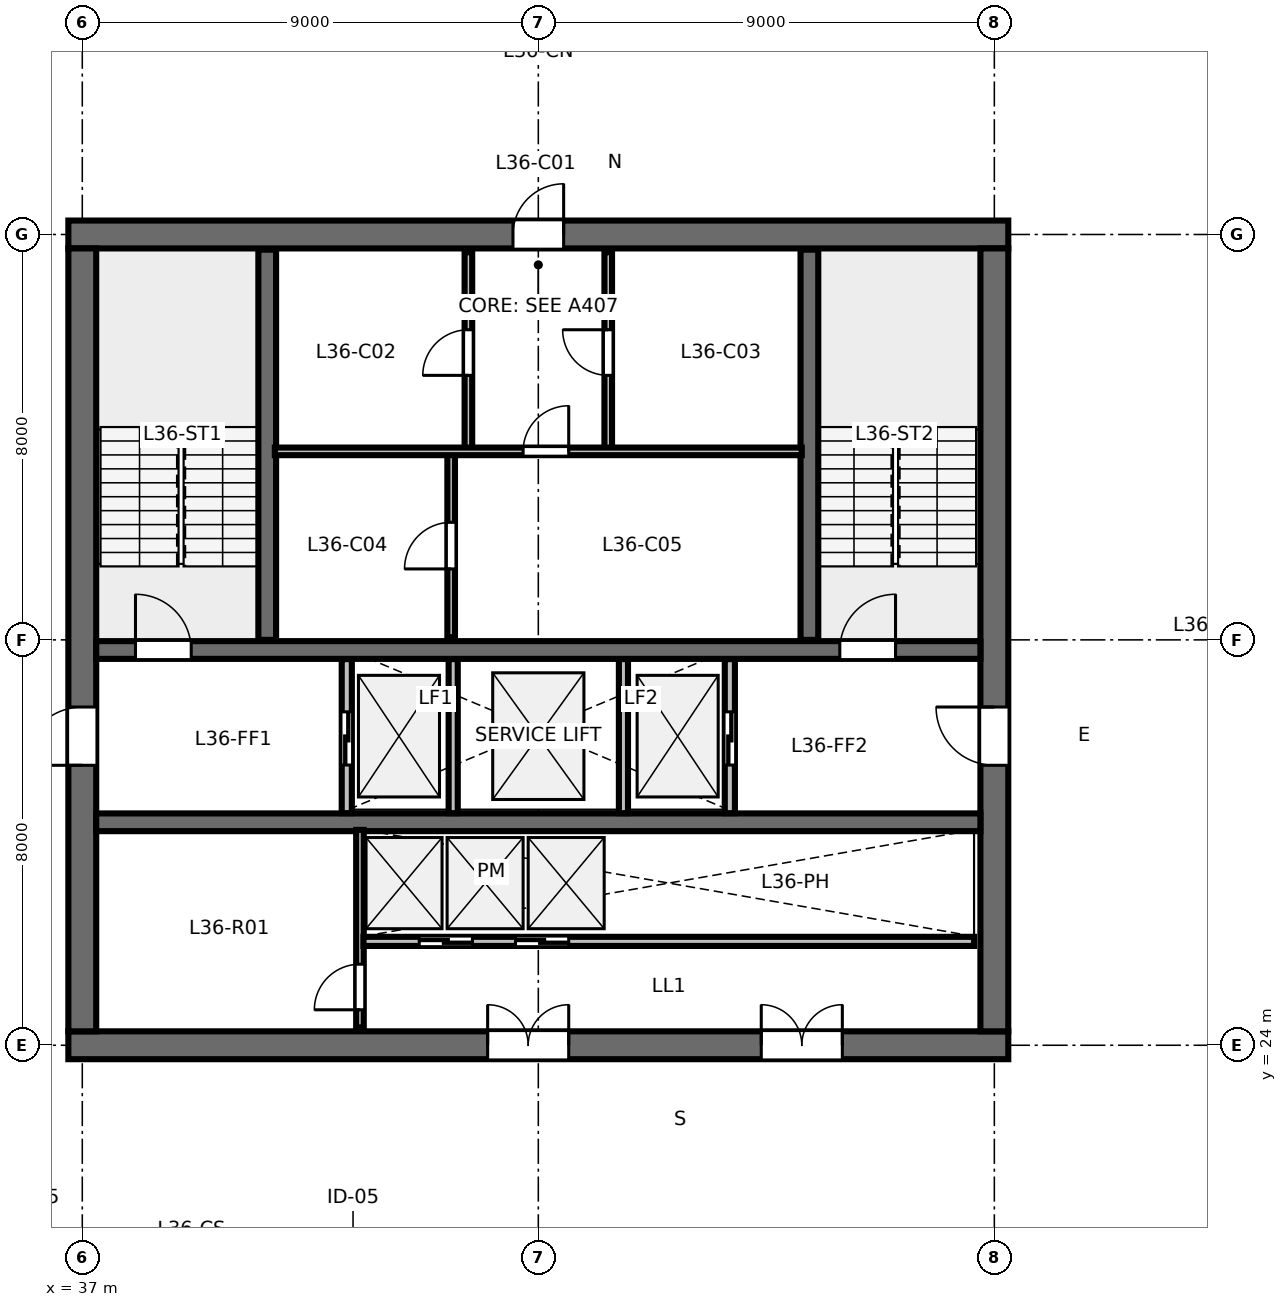
"""IFC4 building model, lengths in metres.
Left out: names, types, materials, properties, quantities, classifications, styles, units other than length and angle.
Written with IfcOpenShell. Run it as: python <this file> out.ifc"""

import sys

from ifc_helpers import new_model, si_unit, direction, frame, frame_2d, origin, place, context, subcontext, project, spatial, rectangle, extrude, element, fill, save


model = new_model("IFC4")
c1 = context("Model", 3, precision=1e-05, world=origin(), true_north=direction((0.0, 1.0)))
c2 = subcontext(c1, "Body", "Model", "MODEL_VIEW")
j1 = project(units=[si_unit("LENGTHUNIT", "METRE"), si_unit("PLANEANGLEUNIT", "RADIAN")], contexts=[c1])
p1 = place(None, origin())
s1 = spatial("IfcSite", under=j1, at=p1, CompositionType="ELEMENT")
p2 = place(p1, origin())
s2 = spatial("IfcBuilding", under=s1, at=p2, CompositionType="ELEMENT")
p3 = place(p2, frame((0.0, 0.0, 138.4)))
s3 = spatial("IfcBuildingStorey", under=s2, at=p3, CompositionType="ELEMENT", Elevation=138.4)
p4 = place(p3, frame((36.725, 24.0, 0.0), z_axis=(0.0, 0.0, 1.0), x_axis=(1.0, 0.0, 0.0)))
e1 = element("IfcWall", 1, at=p4, inside=s3, PredefinedType="SHEAR", context=c2, shape_type="SweptSolid", body=[
    extrude(rectangle(XDim=18.55, YDim=0.55, at=frame_2d((9.275, 0.0))), origin(), (0.0, 0.0, 1.0), 3.36),
])
p5 = place(p4, frame((8.275, 0.0, 0.0)))
e2 = element("IfcOpeningElement", 2, at=p5, cuts=e1, PredefinedType="OPENING", context=c2, shape_type="SweptSolid", body=[
    extrude(rectangle(XDim=1.6, YDim=2.15, at=frame_2d((0.8, 1.075))), frame((0.0, 0.285, 0.0), z_axis=(0.0, -1.0, 0.0), x_axis=(1.0, 0.0, 0.0)), (0.0, 0.0, 1.0), 0.57),
])
p6 = place(p4, frame((13.675, 0.0, 0.0)))
e3 = element("IfcOpeningElement", 3, at=p6, cuts=e1, PredefinedType="OPENING", context=c2, shape_type="SweptSolid", body=[
    extrude(rectangle(XDim=1.6, YDim=2.15, at=frame_2d((0.8, 1.075))), frame((0.0, 0.285, 0.0), z_axis=(0.0, -1.0, 0.0), x_axis=(1.0, 0.0, 0.0)), (0.0, 0.0, 1.0), 0.57),
])
p7 = place(p3, frame((36.725, 40.0, 0.0), z_axis=(0.0, 0.0, 1.0), x_axis=(1.0, 0.0, 0.0)))
e4 = element("IfcWall", 4, at=p7, inside=s3, PredefinedType="SHEAR", context=c2, shape_type="SweptSolid", body=[
    extrude(rectangle(XDim=18.55, YDim=0.55, at=frame_2d((9.275, 0.0))), origin(), (0.0, 0.0, 1.0), 3.36),
])
p8 = place(p7, frame((8.775, 0.0, 0.0)))
e5 = element("IfcOpeningElement", 5, at=p8, cuts=e4, PredefinedType="OPENING", context=c2, shape_type="SweptSolid", body=[
    extrude(rectangle(XDim=1.0, YDim=2.15, at=frame_2d((0.5, 1.075))), frame((0.0, 0.285, 0.0), z_axis=(0.0, -1.0, 0.0), x_axis=(1.0, 0.0, 0.0)), (0.0, 0.0, 1.0), 0.57),
])
p9 = place(p3, frame((37.0, 24.275, 0.0), z_axis=(0.0, 0.0, 1.0), x_axis=(0.0, 1.0, 0.0)))
e6 = element("IfcWall", 6, at=p9, inside=s3, PredefinedType="SHEAR", context=c2, shape_type="SweptSolid", body=[
    extrude(rectangle(XDim=15.45, YDim=0.55, at=frame_2d((7.725, 0.0))), origin(), (0.0, 0.0, 1.0), 3.36),
])
p10 = place(p9, frame((5.25, 0.0, 0.0)))
e7 = element("IfcOpeningElement", 7, at=p10, cuts=e6, PredefinedType="OPENING", context=c2, shape_type="SweptSolid", body=[
    extrude(rectangle(XDim=1.15, YDim=2.15, at=frame_2d((0.575, 1.075))), frame((0.0, 0.285, 0.0), z_axis=(0.0, -1.0, 0.0), x_axis=(1.0, 0.0, 0.0)), (0.0, 0.0, 1.0), 0.57),
])
p11 = place(p3, frame((55.0, 24.275, 0.0), z_axis=(0.0, 0.0, 1.0), x_axis=(0.0, 1.0, 0.0)))
e8 = element("IfcWall", 8, at=p11, inside=s3, PredefinedType="SHEAR", context=c2, shape_type="SweptSolid", body=[
    extrude(rectangle(XDim=15.45, YDim=0.55, at=frame_2d((7.725, 0.0))), origin(), (0.0, 0.0, 1.0), 3.36),
])
p12 = place(p11, frame((5.25, 0.0, 0.0)))
e9 = element("IfcOpeningElement", 9, at=p12, cuts=e8, PredefinedType="OPENING", context=c2, shape_type="SweptSolid", body=[
    extrude(rectangle(XDim=1.15, YDim=2.15, at=frame_2d((0.575, 1.075))), frame((0.0, 0.285, 0.0), z_axis=(0.0, -1.0, 0.0), x_axis=(1.0, 0.0, 0.0)), (0.0, 0.0, 1.0), 0.57),
])
p13 = place(p3, frame((37.275, 31.8, 0.0), z_axis=(0.0, 0.0, 1.0), x_axis=(1.0, 0.0, 0.0)))
e10 = element("IfcWall", 10, at=p13, inside=s3, PredefinedType="SHEAR", context=c2, shape_type="SweptSolid", body=[
    extrude(rectangle(XDim=17.45, YDim=0.35, at=frame_2d((8.725, 0.0))), origin(), (0.0, 0.0, 1.0), 3.36),
])
p14 = place(p13, frame((0.775, 0.0, 0.0)))
e11 = element("IfcOpeningElement", 11, at=p14, cuts=e10, PredefinedType="OPENING", context=c2, shape_type="SweptSolid", body=[
    extrude(rectangle(XDim=1.1, YDim=2.15, at=frame_2d((0.55, 1.075))), frame((0.0, 0.185, 0.0), z_axis=(0.0, -1.0, 0.0), x_axis=(1.0, 0.0, 0.0)), (0.0, 0.0, 1.0), 0.37),
])
p15 = place(p13, frame((14.675, 0.0, 0.0)))
e12 = element("IfcOpeningElement", 12, at=p15, cuts=e10, PredefinedType="OPENING", context=c2, shape_type="SweptSolid", body=[
    extrude(rectangle(XDim=1.1, YDim=2.15, at=frame_2d((0.55, 1.075))), frame((0.0, 0.185, 0.0), z_axis=(0.0, -1.0, 0.0), x_axis=(1.0, 0.0, 0.0)), (0.0, 0.0, 1.0), 0.37),
])
p16 = place(p3, frame((37.275, 28.4, 0.0), z_axis=(0.0, 0.0, 1.0), x_axis=(1.0, 0.0, 0.0)))
e13 = element("IfcWall", 13, at=p16, inside=s3, PredefinedType="SHEAR", context=c2, shape_type="SweptSolid", body=[
    extrude(rectangle(XDim=17.45, YDim=0.35, at=frame_2d((8.725, 0.0))), origin(), (0.0, 0.0, 1.0), 3.36),
])
for number, where, z_axis, x_axis in (
    (14, (40.65, 32.0, 0.0), (0.0, 0.0, 1.0), (0.0, 1.0, 0.0)),
    (15, (51.35, 32.0, 0.0), (0.0, 0.0, 1.0), (0.0, 1.0, 0.0)),
):
    element("IfcWall", number, at=place(p3, frame(where, z_axis=z_axis, x_axis=x_axis)), inside=s3, PredefinedType="SHEAR", context=c2, shape_type="SweptSolid", body=[
        extrude(rectangle(XDim=7.7, YDim=0.35, at=frame_2d((3.85, 0.0))), origin(), (0.0, 0.0, 1.0), 3.6),
    ])
p17 = place(p3, frame((44.62, 35.72, 0.0), z_axis=(0.0, 0.0, 1.0), x_axis=(0.0, 1.0, 0.0)))
e16 = element("IfcWall", 16, at=p17, inside=s3, PredefinedType="PARTITIONING", context=c2, shape_type="SweptSolid", body=[
    extrude(rectangle(XDim=3.93, YDim=0.15, at=frame_2d((1.965, 0.0))), origin(), (0.0, 0.0, 1.0), 3.36),
])
p18 = place(p17, frame((1.5, 0.0, 0.0)))
e17 = element("IfcOpeningElement", 17, at=p18, cuts=e16, PredefinedType="OPENING", context=c2, shape_type="SweptSolid", body=[
    extrude(rectangle(XDim=0.9, YDim=2.15, at=frame_2d((0.45, 1.075))), frame((0.0, 0.085, 0.0), z_axis=(0.0, -1.0, 0.0), x_axis=(1.0, 0.0, 0.0)), (0.0, 0.0, 1.0), 0.17),
])
p19 = place(p3, frame((47.38, 35.72, 0.0), z_axis=(0.0, 0.0, 1.0), x_axis=(0.0, 1.0, 0.0)))
e18 = element("IfcWall", 18, at=p19, inside=s3, PredefinedType="PARTITIONING", context=c2, shape_type="SweptSolid", body=[
    extrude(rectangle(XDim=3.93, YDim=0.15, at=frame_2d((1.965, 0.0))), origin(), (0.0, 0.0, 1.0), 3.36),
])
p20 = place(p19, frame((1.5, 0.0, 0.0)))
e19 = element("IfcOpeningElement", 19, at=p20, cuts=e18, PredefinedType="OPENING", context=c2, shape_type="SweptSolid", body=[
    extrude(rectangle(XDim=0.9, YDim=2.15, at=frame_2d((0.45, 1.075))), frame((0.0, 0.085, 0.0), z_axis=(0.0, -1.0, 0.0), x_axis=(1.0, 0.0, 0.0)), (0.0, 0.0, 1.0), 0.17),
])
p21 = place(p3, frame((44.28, 32.05, 0.0), z_axis=(0.0, 0.0, 1.0), x_axis=(0.0, 1.0, 0.0)))
e20 = element("IfcWall", 20, at=p21, inside=s3, PredefinedType="PARTITIONING", context=c2, shape_type="SweptSolid", body=[
    extrude(rectangle(XDim=3.67, YDim=0.15, at=frame_2d((1.835, 0.0))), origin(), (0.0, 0.0, 1.0), 3.36),
])
p22 = place(p21, frame((1.35, 0.0, 0.0)))
e21 = element("IfcOpeningElement", 21, at=p22, cuts=e20, PredefinedType="OPENING", context=c2, shape_type="SweptSolid", body=[
    extrude(rectangle(XDim=0.92, YDim=2.15, at=frame_2d((0.46, 1.075))), frame((0.0, 0.085, 0.0), z_axis=(0.0, -1.0, 0.0), x_axis=(1.0, 0.0, 0.0)), (0.0, 0.0, 1.0), 0.17),
])
p23 = place(p3, frame((40.8, 35.72, 0.0), z_axis=(0.0, 0.0, 1.0), x_axis=(1.0, 0.0, 0.0)))
e22 = element("IfcWall", 22, at=p23, inside=s3, PredefinedType="PARTITIONING", context=c2, shape_type="SweptSolid", body=[
    extrude(rectangle(XDim=10.4, YDim=0.15, at=frame_2d((5.2, 0.0))), origin(), (0.0, 0.0, 1.0), 3.36),
])
p24 = place(p23, frame((4.9, 0.0, 0.0)))
e23 = element("IfcOpeningElement", 23, at=p24, cuts=e22, PredefinedType="OPENING", context=c2, shape_type="SweptSolid", body=[
    extrude(rectangle(XDim=0.9, YDim=2.15, at=frame_2d((0.45, 1.075))), frame((0.0, 0.085, 0.0), z_axis=(0.0, -1.0, 0.0), x_axis=(1.0, 0.0, 0.0)), (0.0, 0.0, 1.0), 0.17),
])
p25 = place(p3, frame((42.22, 28.58, 0.0), z_axis=(0.0, 0.0, 1.0), x_axis=(0.0, 1.0, 0.0)))
e24 = element("IfcWall", 24, at=p25, inside=s3, PredefinedType="PARTITIONING", context=c2, shape_type="SweptSolid", body=[
    extrude(rectangle(XDim=3.04, YDim=0.2, at=frame_2d((1.52, 0.0))), origin(), (0.0, 0.0, 1.0), 3.36),
])
p26 = place(p25, frame((0.95, 0.0, 0.0)))
e25 = element("IfcOpeningElement", 25, at=p26, cuts=e24, PredefinedType="OPENING", context=c2, shape_type="SweptSolid", body=[
    extrude(rectangle(XDim=1.05, YDim=2.15, at=frame_2d((0.525, 1.075))), frame((0.0, 0.11, 0.0), z_axis=(0.0, -1.0, 0.0), x_axis=(1.0, 0.0, 0.0)), (0.0, 0.0, 1.0), 0.22),
])
p27 = place(p3, frame((49.78, 28.58, 0.0), z_axis=(0.0, 0.0, 1.0), x_axis=(0.0, 1.0, 0.0)))
e26 = element("IfcWall", 26, at=p27, inside=s3, PredefinedType="PARTITIONING", context=c2, shape_type="SweptSolid", body=[
    extrude(rectangle(XDim=3.04, YDim=0.2, at=frame_2d((1.52, 0.0))), origin(), (0.0, 0.0, 1.0), 3.36),
])
p28 = place(p27, frame((0.95, 0.0, 0.0)))
e27 = element("IfcOpeningElement", 27, at=p28, cuts=e26, PredefinedType="OPENING", context=c2, shape_type="SweptSolid", body=[
    extrude(rectangle(XDim=1.05, YDim=2.15, at=frame_2d((0.525, 1.075))), frame((0.0, 0.11, 0.0), z_axis=(0.0, -1.0, 0.0), x_axis=(1.0, 0.0, 0.0)), (0.0, 0.0, 1.0), 0.22),
])
for number, where, z_axis, x_axis in (
    (28, (44.32, 28.58, 0.0), (0.0, 0.0, 1.0), (0.0, 1.0, 0.0)),
    (29, (47.68, 28.58, 0.0), (0.0, 0.0, 1.0), (0.0, 1.0, 0.0)),
):
    element("IfcWall", number, at=place(p3, frame(where, z_axis=z_axis, x_axis=x_axis)), inside=s3, PredefinedType="PARTITIONING", context=c2, shape_type="SweptSolid", body=[
        extrude(rectangle(XDim=3.04, YDim=0.18, at=frame_2d((1.52, 0.0))), origin(), (0.0, 0.0, 1.0), 3.36),
    ])
p29 = place(p3, frame((42.48, 24.35, 0.0), z_axis=(0.0, 0.0, 1.0), x_axis=(0.0, 1.0, 0.0)))
e30 = element("IfcWall", 30, at=p29, inside=s3, PredefinedType="PARTITIONING", context=c2, shape_type="SweptSolid", body=[
    extrude(rectangle(XDim=3.9, YDim=0.15, at=frame_2d((1.95, 0.0))), origin(), (0.0, 0.0, 1.0), 3.36),
])
p30 = place(p29, frame((0.35, 0.0, 0.0)))
e31 = element("IfcOpeningElement", 31, at=p30, cuts=e30, PredefinedType="OPENING", context=c2, shape_type="SweptSolid", body=[
    extrude(rectangle(XDim=0.9, YDim=2.15, at=frame_2d((0.45, 1.075))), frame((0.0, 0.085, 0.0), z_axis=(0.0, -1.0, 0.0), x_axis=(1.0, 0.0, 0.0)), (0.0, 0.0, 1.0), 0.17),
])
p31 = place(p3, frame((42.55, 26.05, 0.0), z_axis=(0.0, 0.0, 1.0), x_axis=(1.0, 0.0, 0.0)))
e32 = element("IfcWall", 32, at=p31, inside=s3, PredefinedType="PARTITIONING", context=c2, shape_type="SweptSolid", body=[
    extrude(rectangle(XDim=12.05, YDim=0.18, at=frame_2d((6.025, 0.0))), origin(), (0.0, 0.0, 1.0), 3.36),
])
p32 = place(p31, frame((1.1, 0.0, 0.0)))
e33 = element("IfcOpeningElement", 33, at=p32, cuts=e32, PredefinedType="OPENING", context=c2, shape_type="SweptSolid", body=[
    extrude(rectangle(XDim=1.05, YDim=2.15, at=frame_2d((0.525, 1.075))), frame((0.0, 0.1, 0.0), z_axis=(0.0, -1.0, 0.0), x_axis=(1.0, 0.0, 0.0)), (0.0, 0.0, 1.0), 0.2),
])
p33 = place(p31, frame((3.0, 0.0, 0.0)))
e34 = element("IfcOpeningElement", 34, at=p33, cuts=e32, PredefinedType="OPENING", context=c2, shape_type="SweptSolid", body=[
    extrude(rectangle(XDim=1.05, YDim=2.15, at=frame_2d((0.525, 1.075))), frame((0.0, 0.1, 0.0), z_axis=(0.0, -1.0, 0.0), x_axis=(1.0, 0.0, 0.0)), (0.0, 0.0, 1.0), 0.2),
])
p34 = place(p14, origin())
e35 = element("IfcDoor", 35, at=p34, inside=s3, OperationType="SINGLE_SWING_LEFT", PredefinedType="DOOR", context=c2, shape_type="SweptSolid", body=[
    extrude(rectangle(XDim=1.1, YDim=2.15, at=frame_2d((0.55, 1.075))), frame((0.0, 0.025, 0.0), z_axis=(0.0, -1.0, 0.0), x_axis=(1.0, 0.0, 0.0)), (0.0, 0.0, 1.0), 0.05),
])
fill(e11, e35)
p35 = place(p15, origin())
e36 = element("IfcDoor", 36, at=p35, inside=s3, OperationType="SINGLE_SWING_RIGHT", PredefinedType="DOOR", context=c2, shape_type="SweptSolid", body=[
    extrude(rectangle(XDim=1.1, YDim=2.15, at=frame_2d((0.55, 1.075))), frame((0.0, 0.025, 0.0), z_axis=(0.0, -1.0, 0.0), x_axis=(1.0, 0.0, 0.0)), (0.0, 0.0, 1.0), 0.05),
])
fill(e12, e36)
p36 = place(p8, origin())
e37 = element("IfcDoor", 37, at=p36, inside=s3, OperationType="SINGLE_SWING_RIGHT", PredefinedType="DOOR", context=c2, shape_type="SweptSolid", body=[
    extrude(rectangle(XDim=1.0, YDim=2.15, at=frame_2d((0.5, 1.075))), frame((0.0, 0.025, 0.0), z_axis=(0.0, -1.0, 0.0), x_axis=(1.0, 0.0, 0.0)), (0.0, 0.0, 1.0), 0.05),
])
fill(e5, e37)
p37 = place(p10, origin())
e38 = element("IfcDoor", 38, at=p37, inside=s3, OperationType="SINGLE_SWING_LEFT", PredefinedType="DOOR", context=c2, shape_type="SweptSolid", body=[
    extrude(rectangle(XDim=1.15, YDim=2.15, at=frame_2d((0.575, 1.075))), frame((0.0, 0.025, 0.0), z_axis=(0.0, -1.0, 0.0), x_axis=(1.0, 0.0, 0.0)), (0.0, 0.0, 1.0), 0.05),
])
fill(e7, e38)
p38 = place(p12, origin())
e39 = element("IfcDoor", 39, at=p38, inside=s3, OperationType="SINGLE_SWING_RIGHT", PredefinedType="DOOR", context=c2, shape_type="SweptSolid", body=[
    extrude(rectangle(XDim=1.15, YDim=2.15, at=frame_2d((0.575, 1.075))), frame((0.0, 0.025, 0.0), z_axis=(0.0, -1.0, 0.0), x_axis=(1.0, 0.0, 0.0)), (0.0, 0.0, 1.0), 0.05),
])
fill(e9, e39)
p39 = place(p5, origin())
e40 = element("IfcDoor", 40, at=p39, inside=s3, OperationType="DOUBLE_DOOR_SINGLE_SWING", PredefinedType="DOOR", context=c2, shape_type="SweptSolid", body=[
    extrude(rectangle(XDim=1.6, YDim=2.15, at=frame_2d((0.8, 1.075))), frame((0.0, 0.025, 0.0), z_axis=(0.0, -1.0, 0.0), x_axis=(1.0, 0.0, 0.0)), (0.0, 0.0, 1.0), 0.05),
])
fill(e2, e40)
p40 = place(p6, origin())
e41 = element("IfcDoor", 41, at=p40, inside=s3, OperationType="DOUBLE_DOOR_SINGLE_SWING", PredefinedType="DOOR", context=c2, shape_type="SweptSolid", body=[
    extrude(rectangle(XDim=1.6, YDim=2.15, at=frame_2d((0.8, 1.075))), frame((0.0, 0.025, 0.0), z_axis=(0.0, -1.0, 0.0), x_axis=(1.0, 0.0, 0.0)), (0.0, 0.0, 1.0), 0.05),
])
fill(e3, e41)
p41 = place(p18, origin())
e42 = element("IfcDoor", 42, at=p41, inside=s3, OperationType="SINGLE_SWING_LEFT", PredefinedType="DOOR", context=c2, shape_type="SweptSolid", body=[
    extrude(rectangle(XDim=0.9, YDim=2.15, at=frame_2d((0.45, 1.075))), frame((0.0, 0.025, 0.0), z_axis=(0.0, -1.0, 0.0), x_axis=(1.0, 0.0, 0.0)), (0.0, 0.0, 1.0), 0.05),
])
fill(e17, e42)
p42 = place(p20, origin())
e43 = element("IfcDoor", 43, at=p42, inside=s3, OperationType="SINGLE_SWING_RIGHT", PredefinedType="DOOR", context=c2, shape_type="SweptSolid", body=[
    extrude(rectangle(XDim=0.9, YDim=2.15, at=frame_2d((0.45, 1.075))), frame((0.0, 0.025, 0.0), z_axis=(0.0, -1.0, 0.0), x_axis=(1.0, 0.0, 0.0)), (0.0, 0.0, 1.0), 0.05),
])
fill(e19, e43)
p43 = place(p22, origin())
e44 = element("IfcDoor", 44, at=p43, inside=s3, OperationType="SINGLE_SWING_LEFT", PredefinedType="DOOR", context=c2, shape_type="SweptSolid", body=[
    extrude(rectangle(XDim=0.92, YDim=2.15, at=frame_2d((0.46, 1.075))), frame((0.0, 0.025, 0.0), z_axis=(0.0, -1.0, 0.0), x_axis=(1.0, 0.0, 0.0)), (0.0, 0.0, 1.0), 0.05),
])
fill(e21, e44)
p44 = place(p24, origin())
e45 = element("IfcDoor", 45, at=p44, inside=s3, OperationType="SINGLE_SWING_RIGHT", PredefinedType="DOOR", context=c2, shape_type="SweptSolid", body=[
    extrude(rectangle(XDim=0.9, YDim=2.15, at=frame_2d((0.45, 1.075))), frame((0.0, 0.025, 0.0), z_axis=(0.0, -1.0, 0.0), x_axis=(1.0, 0.0, 0.0)), (0.0, 0.0, 1.0), 0.05),
])
fill(e23, e45)
p45 = place(p26, origin())
e46 = element("IfcDoor", 46, at=p45, inside=s3, OperationType="SLIDING_TO_LEFT", PredefinedType="DOOR", context=c2, shape_type="SweptSolid", body=[
    extrude(rectangle(XDim=1.05, YDim=2.15, at=frame_2d((0.525, 1.075))), frame((0.0, 0.025, 0.0), z_axis=(0.0, -1.0, 0.0), x_axis=(1.0, 0.0, 0.0)), (0.0, 0.0, 1.0), 0.05),
])
fill(e25, e46)
p46 = place(p28, origin())
e47 = element("IfcDoor", 47, at=p46, inside=s3, OperationType="SLIDING_TO_RIGHT", PredefinedType="DOOR", context=c2, shape_type="SweptSolid", body=[
    extrude(rectangle(XDim=1.05, YDim=2.15, at=frame_2d((0.525, 1.075))), frame((0.0, 0.025, 0.0), z_axis=(0.0, -1.0, 0.0), x_axis=(1.0, 0.0, 0.0)), (0.0, 0.0, 1.0), 0.05),
])
fill(e27, e47)
p47 = place(p30, origin())
e48 = element("IfcDoor", 48, at=p47, inside=s3, OperationType="SINGLE_SWING_LEFT", PredefinedType="DOOR", context=c2, shape_type="SweptSolid", body=[
    extrude(rectangle(XDim=0.9, YDim=2.15, at=frame_2d((0.45, 1.075))), frame((0.0, 0.025, 0.0), z_axis=(0.0, -1.0, 0.0), x_axis=(1.0, 0.0, 0.0)), (0.0, 0.0, 1.0), 0.05),
])
fill(e31, e48)
p48 = place(p32, origin())
e49 = element("IfcDoor", 49, at=p48, inside=s3, OperationType="SLIDING_TO_LEFT", PredefinedType="DOOR", context=c2, shape_type="SweptSolid", body=[
    extrude(rectangle(XDim=1.05, YDim=2.15, at=frame_2d((0.525, 1.075))), frame((0.0, 0.025, 0.0), z_axis=(0.0, -1.0, 0.0), x_axis=(1.0, 0.0, 0.0)), (0.0, 0.0, 1.0), 0.05),
])
fill(e33, e49)
p49 = place(p33, origin())
e50 = element("IfcDoor", 50, at=p49, inside=s3, OperationType="SLIDING_TO_RIGHT", PredefinedType="DOOR", context=c2, shape_type="SweptSolid", body=[
    extrude(rectangle(XDim=1.05, YDim=2.15, at=frame_2d((0.525, 1.075))), frame((0.0, 0.025, 0.0), z_axis=(0.0, -1.0, 0.0), x_axis=(1.0, 0.0, 0.0)), (0.0, 0.0, 1.0), 0.05),
])
fill(e34, e50)
save(model, sys.argv[1])
